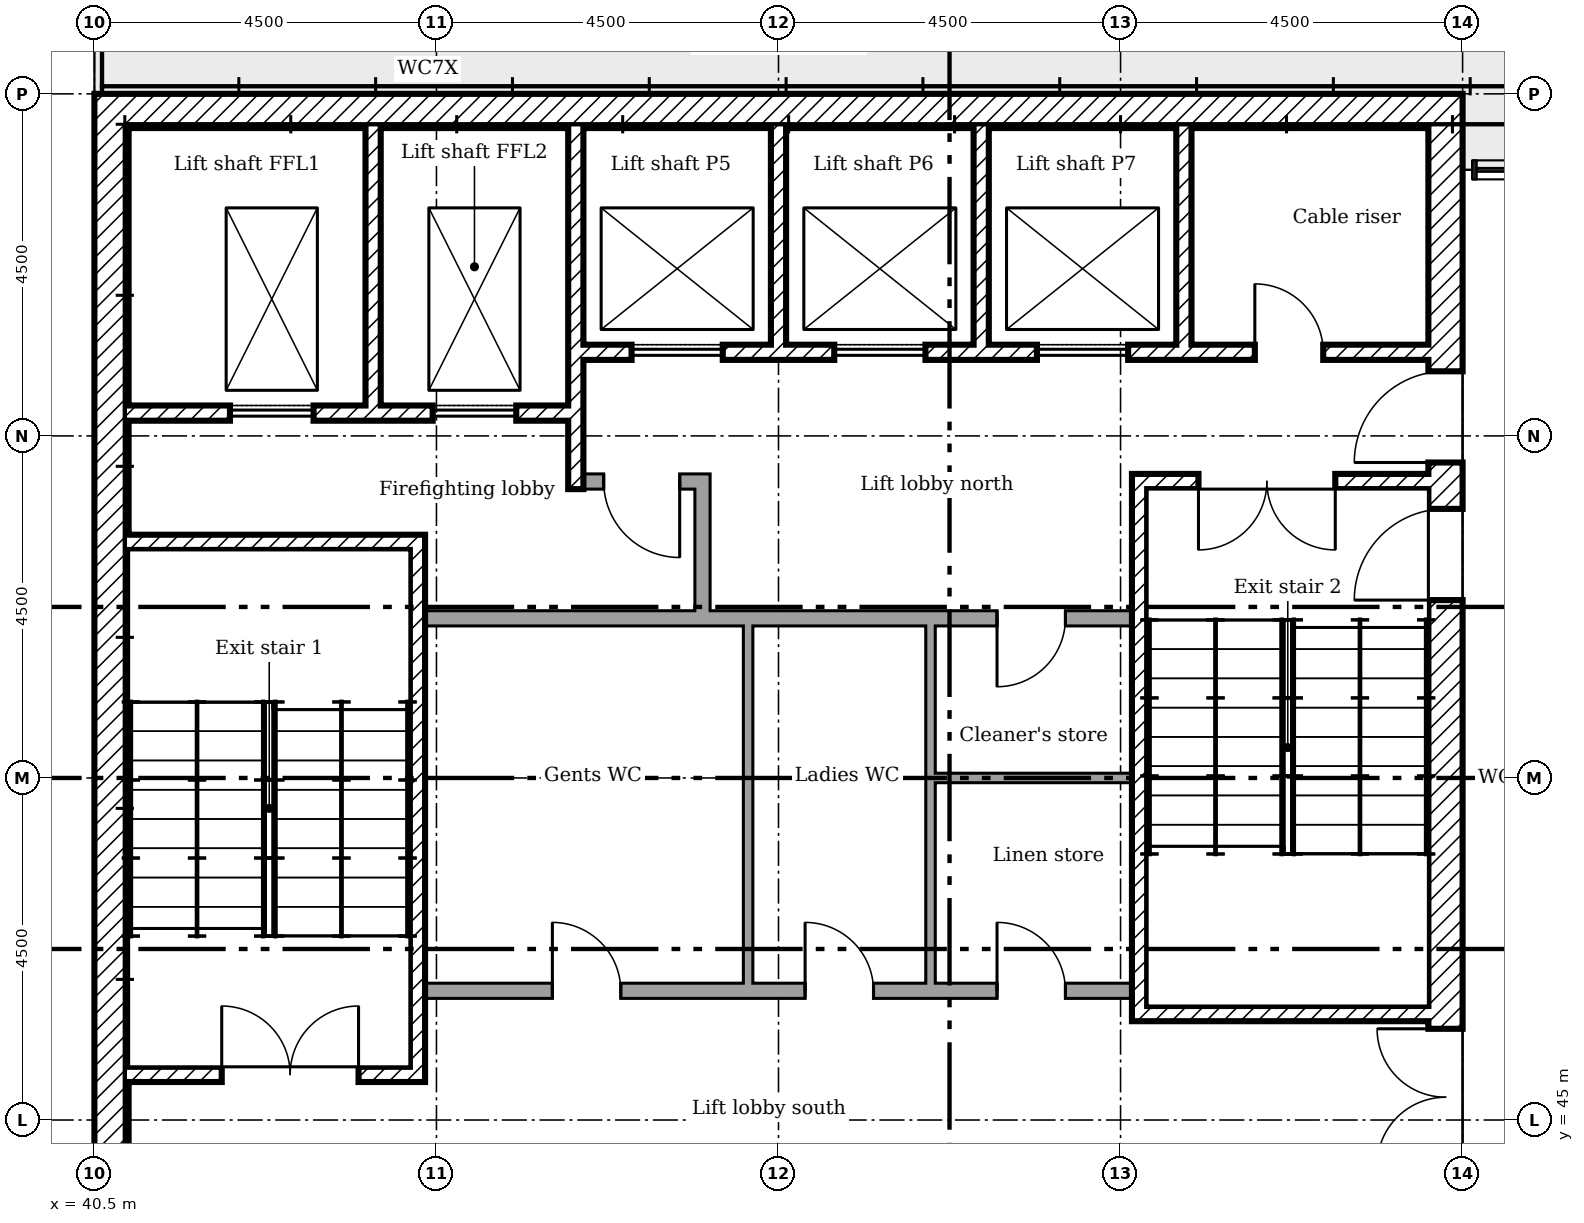
"""IFC4 building model, lengths in metres.
Left out: names, types, materials, properties, quantities, classifications, styles, units other than length and angle.
Written with IfcOpenShell. Run it as: python <this file> out.ifc"""

import sys

from ifc_helpers import new_model, si_unit, direction, frame, frame_2d, origin, place, context, subcontext, project, spatial, rectangle, extrude, element, fill, save


model = new_model("IFC4")
c1 = context("Model", 3, precision=1e-05, world=origin(), true_north=direction((0.0, 1.0)))
c2 = subcontext(c1, "Body", "Model", "MODEL_VIEW")
j1 = project(units=[si_unit("LENGTHUNIT", "METRE"), si_unit("PLANEANGLEUNIT", "RADIAN")], contexts=[c1])
p1 = place(None, origin())
s1 = spatial("IfcSite", under=j1, at=p1, CompositionType="ELEMENT")
p2 = place(p1, origin())
s2 = spatial("IfcBuilding", under=s1, at=p2, CompositionType="ELEMENT")
p3 = place(p2, frame((0.0, 0.0, 263.6)))
s3 = spatial("IfcBuildingStorey", under=s2, at=p3, CompositionType="ELEMENT", Elevation=263.6)
p4 = place(p3, frame((58.275, 40.5, 0.0), z_axis=(0.0, 0.0, 1.0), x_axis=(0.0, 1.0, 0.0)))
e1 = element("IfcWall", 1, at=p4, inside=s3, PredefinedType="SHEAR", context=c2, shape_type="SweptSolid", body=[
    extrude(rectangle(XDim=18.0, YDim=0.45, at=frame_2d((9.0, 0.0))), origin(), (0.0, 0.0, 1.0), 5.725),
])
p5 = place(p4, frame((13.15, 0.0, 0.0)))
e2 = element("IfcOpeningElement", 2, at=p5, cuts=e1, PredefinedType="OPENING", context=c2, shape_type="SweptSolid", body=[
    extrude(rectangle(XDim=1.2, YDim=2.1, at=frame_2d((0.6, 1.05))), frame((0.0, 0.235, 0.0), z_axis=(0.0, -1.0, 0.0), x_axis=(1.0, 0.0, 0.0)), (0.0, 0.0, 1.0), 0.47),
])
p6 = place(p4, frame((3.9, 0.0, 0.0)))
e3 = element("IfcOpeningElement", 3, at=p6, cuts=e1, PredefinedType="OPENING", context=c2, shape_type="SweptSolid", body=[
    extrude(rectangle(XDim=1.8, YDim=2.1, at=frame_2d((0.9, 1.05))), frame((0.0, 0.235, 0.0), z_axis=(0.0, -1.0, 0.0), x_axis=(1.0, 0.0, 0.0)), (0.0, 0.0, 1.0), 0.47),
])
p7 = place(p4, frame((11.34, 0.0, 0.0)))
e4 = element("IfcOpeningElement", 4, at=p7, cuts=e1, PredefinedType="OPENING", context=c2, shape_type="SweptSolid", body=[
    extrude(rectangle(XDim=1.2, YDim=2.1, at=frame_2d((0.6, 1.05))), frame((0.0, 0.235, 0.0), z_axis=(0.0, -1.0, 0.0), x_axis=(1.0, 0.0, 0.0)), (0.0, 0.0, 1.0), 0.47),
])
p8 = place(p3, frame((40.5, 58.275, 0.0)))
e5 = element("IfcWall", 5, at=p8, inside=s3, PredefinedType="SHEAR", context=c2, shape_type="SweptSolid", body=[
    extrude(rectangle(XDim=17.55, YDim=0.45, at=frame_2d((8.775, 0.0))), origin(), (0.0, 0.0, 1.0), 5.725),
])
p9 = place(p3, frame((40.725, 40.95, 0.0), z_axis=(0.0, 0.0, 1.0), x_axis=(0.0, 1.0, 0.0)))
e6 = element("IfcWall", 6, at=p9, inside=s3, PredefinedType="SHEAR", context=c2, shape_type="SweptSolid", body=[
    extrude(rectangle(XDim=17.1, YDim=0.45, at=frame_2d((8.55, 0.0))), origin(), (0.0, 0.0, 1.0), 5.725),
])
p10 = place(p3, frame((44.167, 58.05, 0.0), z_axis=(0.0, 0.0, 1.0), x_axis=(0.0, -1.0, 0.0)))
e7 = element("IfcWall", 7, at=p10, inside=s3, PredefinedType="SHEAR", context=c2, shape_type="SweptSolid", body=[
    extrude(rectangle(XDim=3.65, YDim=0.2, at=frame_2d((1.825, 0.0))), origin(), (0.0, 0.0, 1.0), 5.725),
])
p11 = place(p3, frame((46.833, 58.05, 0.0), z_axis=(0.0, 0.0, 1.0), x_axis=(0.0, -1.0, 0.0)))
e8 = element("IfcWall", 8, at=p11, inside=s3, PredefinedType="SHEAR", context=c2, shape_type="SweptSolid", body=[
    extrude(rectangle(XDim=4.75, YDim=0.2, at=frame_2d((2.375, 0.0))), origin(), (0.0, 0.0, 1.0), 5.725),
])
for number, where, z_axis, x_axis in (
    (9, (49.5, 58.05, 0.0), (0.0, 0.0, 1.0), (0.0, -1.0, 0.0)),
    (10, (52.167, 58.05, 0.0), (0.0, 0.0, 1.0), (0.0, -1.0, 0.0)),
    (11, (54.833, 58.05, 0.0), (0.0, 0.0, 1.0), (0.0, -1.0, 0.0)),
):
    element("IfcWall", number, at=place(p3, frame(where, z_axis=z_axis, x_axis=x_axis)), inside=s3, PredefinedType="SHEAR", context=c2, shape_type="SweptSolid", body=[
        extrude(rectangle(XDim=2.85, YDim=0.2, at=frame_2d((1.425, 0.0))), origin(), (0.0, 0.0, 1.0), 5.725),
    ])
p12 = place(p3, frame((48.5, 51.6, 0.0), z_axis=(0.0, 0.0, 1.0), x_axis=(0.0, 1.0, 0.0)))
e12 = element("IfcWall", 12, at=p12, inside=s3, PredefinedType="PARTITIONING", context=c2, shape_type="SweptSolid", body=[
    extrude(rectangle(XDim=1.9, YDim=0.2, at=frame_2d((0.95, 0.0))), origin(), (0.0, 0.0, 1.0), 5.725),
])
p13 = place(p3, frame((46.933, 53.4, 0.0)))
e13 = element("IfcWall", 13, at=p13, inside=s3, PredefinedType="PARTITIONING", context=c2, shape_type="SweptSolid", body=[
    extrude(rectangle(XDim=1.467, YDim=0.2, at=frame_2d((0.733, 0.0))), origin(), (0.0, 0.0, 1.0), 5.725),
])
p14 = place(p13, frame((0.267, 0.0, 0.0)))
e14 = element("IfcOpeningElement", 14, at=p14, cuts=e13, PredefinedType="OPENING", context=c2, shape_type="SweptSolid", body=[
    extrude(rectangle(XDim=1.0, YDim=2.1, at=frame_2d((0.5, 1.05))), frame((0.0, 0.11, 0.0), z_axis=(0.0, -1.0, 0.0), x_axis=(1.0, 0.0, 0.0)), (0.0, 0.0, 1.0), 0.22),
])
p15 = place(p3, frame((46.933, 55.1, 0.0)))
e15 = element("IfcWall", 15, at=p15, inside=s3, PredefinedType="SHEAR", context=c2, shape_type="SweptSolid", body=[
    extrude(rectangle(XDim=11.117, YDim=0.2, at=frame_2d((5.558, 0.0))), origin(), (0.0, 0.0, 1.0), 5.725),
])
p16 = place(p15, frame((8.833, 0.0, 0.0)))
e16 = element("IfcOpeningElement", 16, at=p16, cuts=e15, PredefinedType="OPENING", context=c2, shape_type="SweptSolid", body=[
    extrude(rectangle(XDim=0.9, YDim=2.1, at=frame_2d((0.45, 1.05))), frame((0.0, 0.11, 0.0), z_axis=(0.0, -1.0, 0.0), x_axis=(1.0, 0.0, 0.0)), (0.0, 0.0, 1.0), 0.22),
])
p17 = place(p15, frame((0.633, 0.0, 0.0)))
e17 = element("IfcOpeningElement", 17, at=p17, cuts=e15, PredefinedType="OPENING", context=c2, shape_type="SweptSolid", body=[
    extrude(rectangle(XDim=1.2, YDim=2.1, at=frame_2d((0.6, 1.05))), frame((0.0, 0.11, 0.0), z_axis=(0.0, -1.0, 0.0), x_axis=(1.0, 0.0, 0.0)), (0.0, 0.0, 1.0), 0.22),
])
p18 = place(p15, frame((3.3, 0.0, 0.0)))
e18 = element("IfcOpeningElement", 18, at=p18, cuts=e15, PredefinedType="OPENING", context=c2, shape_type="SweptSolid", body=[
    extrude(rectangle(XDim=1.2, YDim=2.1, at=frame_2d((0.6, 1.05))), frame((0.0, 0.11, 0.0), z_axis=(0.0, -1.0, 0.0), x_axis=(1.0, 0.0, 0.0)), (0.0, 0.0, 1.0), 0.22),
])
p19 = place(p15, frame((5.967, 0.0, 0.0)))
e19 = element("IfcOpeningElement", 19, at=p19, cuts=e15, PredefinedType="OPENING", context=c2, shape_type="SweptSolid", body=[
    extrude(rectangle(XDim=1.2, YDim=2.1, at=frame_2d((0.6, 1.05))), frame((0.0, 0.11, 0.0), z_axis=(0.0, -1.0, 0.0), x_axis=(1.0, 0.0, 0.0)), (0.0, 0.0, 1.0), 0.22),
])
p20 = place(p3, frame((40.95, 54.3, 0.0)))
e20 = element("IfcWall", 20, at=p20, inside=s3, PredefinedType="SHEAR", context=c2, shape_type="SweptSolid", body=[
    extrude(rectangle(XDim=5.783, YDim=0.2, at=frame_2d((2.892, 0.0))), origin(), (0.0, 0.0, 1.0), 5.725),
])
p21 = place(p20, frame((1.333, 0.0, 0.0)))
e21 = element("IfcOpeningElement", 21, at=p21, cuts=e20, PredefinedType="OPENING", context=c2, shape_type="SweptSolid", body=[
    extrude(rectangle(XDim=1.1, YDim=2.1, at=frame_2d((0.55, 1.05))), frame((0.0, 0.11, 0.0), z_axis=(0.0, -1.0, 0.0), x_axis=(1.0, 0.0, 0.0)), (0.0, 0.0, 1.0), 0.22),
])
p22 = place(p20, frame((4.0, 0.0, 0.0)))
e22 = element("IfcOpeningElement", 22, at=p22, cuts=e20, PredefinedType="OPENING", context=c2, shape_type="SweptSolid", body=[
    extrude(rectangle(XDim=1.1, YDim=2.1, at=frame_2d((0.55, 1.05))), frame((0.0, 0.11, 0.0), z_axis=(0.0, -1.0, 0.0), x_axis=(1.0, 0.0, 0.0)), (0.0, 0.0, 1.0), 0.22),
])
p23 = place(p3, frame((44.75, 45.5, 0.0), z_axis=(0.0, 0.0, 1.0), x_axis=(0.0, 1.0, 0.0)))
e23 = element("IfcWall", 23, at=p23, inside=s3, PredefinedType="SHEAR", context=c2, shape_type="SweptSolid", body=[
    extrude(rectangle(XDim=7.2, YDim=0.2, at=frame_2d((3.6, 0.0))), origin(), (0.0, 0.0, 1.0), 5.725),
])
p24 = place(p3, frame((40.95, 52.6, 0.0)))
e24 = element("IfcWall", 24, at=p24, inside=s3, PredefinedType="SHEAR", context=c2, shape_type="SweptSolid", body=[
    extrude(rectangle(XDim=3.7, YDim=0.2, at=frame_2d((1.85, 0.0))), origin(), (0.0, 0.0, 1.0), 5.725),
])
p25 = place(p3, frame((40.95, 45.6, 0.0)))
e25 = element("IfcWall", 25, at=p25, inside=s3, PredefinedType="SHEAR", context=c2, shape_type="SweptSolid", body=[
    extrude(rectangle(XDim=3.7, YDim=0.2, at=frame_2d((1.85, 0.0))), origin(), (0.0, 0.0, 1.0), 5.725),
])
p26 = place(p25, frame((1.225, 0.0, 0.0)))
e26 = element("IfcOpeningElement", 26, at=p26, cuts=e25, PredefinedType="OPENING", context=c2, shape_type="SweptSolid", body=[
    extrude(rectangle(XDim=1.8, YDim=2.1, at=frame_2d((0.9, 1.05))), frame((0.0, 0.11, 0.0), z_axis=(0.0, -1.0, 0.0), x_axis=(1.0, 0.0, 0.0)), (0.0, 0.0, 1.0), 0.22),
])
p27 = place(p3, frame((54.15, 53.4, 0.0)))
e27 = element("IfcWall", 27, at=p27, inside=s3, PredefinedType="SHEAR", context=c2, shape_type="SweptSolid", body=[
    extrude(rectangle(XDim=3.9, YDim=0.2, at=frame_2d((1.95, 0.0))), origin(), (0.0, 0.0, 1.0), 5.725),
])
p28 = place(p27, frame((0.875, 0.0, 0.0)))
e28 = element("IfcOpeningElement", 28, at=p28, cuts=e27, PredefinedType="OPENING", context=c2, shape_type="SweptSolid", body=[
    extrude(rectangle(XDim=1.8, YDim=2.1, at=frame_2d((0.9, 1.05))), frame((0.0, 0.11, 0.0), z_axis=(0.0, -1.0, 0.0), x_axis=(1.0, 0.0, 0.0)), (0.0, 0.0, 1.0), 0.22),
])
p29 = place(p3, frame((54.15, 46.4, 0.0)))
e29 = element("IfcWall", 29, at=p29, inside=s3, PredefinedType="SHEAR", context=c2, shape_type="SweptSolid", body=[
    extrude(rectangle(XDim=3.9, YDim=0.2, at=frame_2d((1.95, 0.0))), origin(), (0.0, 0.0, 1.0), 5.725),
])
p30 = place(p3, frame((54.25, 46.5, 0.0), z_axis=(0.0, 0.0, 1.0), x_axis=(0.0, 1.0, 0.0)))
e30 = element("IfcWall", 30, at=p30, inside=s3, PredefinedType="SHEAR", context=c2, shape_type="SweptSolid", body=[
    extrude(rectangle(XDim=6.8, YDim=0.2, at=frame_2d((3.4, 0.0))), origin(), (0.0, 0.0, 1.0), 5.725),
])
p31 = place(p3, frame((44.85, 51.6, 0.0)))
e31 = element("IfcWall", 31, at=p31, inside=s3, PredefinedType="PARTITIONING", context=c2, shape_type="SweptSolid", body=[
    extrude(rectangle(XDim=9.3, YDim=0.2, at=frame_2d((4.65, 0.0))), origin(), (0.0, 0.0, 1.0), 5.725),
])
p32 = place(p31, frame((7.525, 0.0, 0.0)))
e32 = element("IfcOpeningElement", 32, at=p32, cuts=e31, PredefinedType="OPENING", context=c2, shape_type="SweptSolid", body=[
    extrude(rectangle(XDim=0.9, YDim=2.1, at=frame_2d((0.45, 1.05))), frame((0.0, 0.11, 0.0), z_axis=(0.0, -1.0, 0.0), x_axis=(1.0, 0.0, 0.0)), (0.0, 0.0, 1.0), 0.22),
])
p33 = place(p3, frame((44.85, 46.7, 0.0)))
e33 = element("IfcWall", 33, at=p33, inside=s3, PredefinedType="PARTITIONING", context=c2, shape_type="SweptSolid", body=[
    extrude(rectangle(XDim=9.3, YDim=0.2, at=frame_2d((4.65, 0.0))), origin(), (0.0, 0.0, 1.0), 5.725),
])
p34 = place(p33, frame((1.675, 0.0, 0.0)))
e34 = element("IfcOpeningElement", 34, at=p34, cuts=e33, PredefinedType="OPENING", context=c2, shape_type="SweptSolid", body=[
    extrude(rectangle(XDim=0.9, YDim=2.1, at=frame_2d((0.45, 1.05))), frame((0.0, 0.11, 0.0), z_axis=(0.0, -1.0, 0.0), x_axis=(1.0, 0.0, 0.0)), (0.0, 0.0, 1.0), 0.22),
])
p35 = place(p33, frame((5.0, 0.0, 0.0)))
e35 = element("IfcOpeningElement", 35, at=p35, cuts=e33, PredefinedType="OPENING", context=c2, shape_type="SweptSolid", body=[
    extrude(rectangle(XDim=0.9, YDim=2.1, at=frame_2d((0.45, 1.05))), frame((0.0, 0.11, 0.0), z_axis=(0.0, -1.0, 0.0), x_axis=(1.0, 0.0, 0.0)), (0.0, 0.0, 1.0), 0.22),
])
p36 = place(p33, frame((7.525, 0.0, 0.0)))
e36 = element("IfcOpeningElement", 36, at=p36, cuts=e33, PredefinedType="OPENING", context=c2, shape_type="SweptSolid", body=[
    extrude(rectangle(XDim=0.9, YDim=2.1, at=frame_2d((0.45, 1.05))), frame((0.0, 0.11, 0.0), z_axis=(0.0, -1.0, 0.0), x_axis=(1.0, 0.0, 0.0)), (0.0, 0.0, 1.0), 0.22),
])
p37 = place(p3, frame((49.1, 46.8, 0.0), z_axis=(0.0, 0.0, 1.0), x_axis=(0.0, 1.0, 0.0)))
e37 = element("IfcWall", 37, at=p37, inside=s3, PredefinedType="PARTITIONING", context=c2, shape_type="SweptSolid", body=[
    extrude(rectangle(XDim=4.7, YDim=0.125, at=frame_2d((2.35, 0.0))), origin(), (0.0, 0.0, 1.0), 5.725),
])
p38 = place(p3, frame((51.5, 46.8, 0.0), z_axis=(0.0, 0.0, 1.0), x_axis=(0.0, 1.0, 0.0)))
e38 = element("IfcWall", 38, at=p38, inside=s3, PredefinedType="PARTITIONING", context=c2, shape_type="SweptSolid", body=[
    extrude(rectangle(XDim=2.762, YDim=0.125, at=frame_2d((1.381, 0.0))), origin(), (0.0, 0.0, 1.0), 5.725),
])
p39 = place(p3, frame((51.562, 49.5, 0.0)))
e39 = element("IfcWall", 39, at=p39, inside=s3, PredefinedType="PARTITIONING", context=c2, shape_type="SweptSolid", body=[
    extrude(rectangle(XDim=2.587, YDim=0.125, at=frame_2d((1.294, 0.0))), origin(), (0.0, 0.0, 1.0), 5.725),
])
p40 = place(p3, frame((51.5, 49.5, 0.0), z_axis=(0.0, 0.0, 1.0), x_axis=(0.0, 1.0, 0.0)))
e40 = element("IfcWall", 40, at=p40, inside=s3, PredefinedType="PARTITIONING", context=c2, shape_type="SweptSolid", body=[
    extrude(rectangle(XDim=2.0, YDim=0.125, at=frame_2d((1.0, 0.0))), origin(), (0.0, 0.0, 1.0), 5.725),
])
p41 = place(p5, origin())
e41 = element("IfcDoor", 41, at=p41, inside=s3, OperationType="SINGLE_SWING_RIGHT", PredefinedType="DOOR", context=c2, shape_type="SweptSolid", body=[
    extrude(rectangle(XDim=1.2, YDim=2.1, at=frame_2d((0.6, 1.05))), frame((0.0, 0.025, 0.0), z_axis=(0.0, -1.0, 0.0), x_axis=(1.0, 0.0, 0.0)), (0.0, 0.0, 1.0), 0.05),
])
fill(e2, e41)
p42 = place(p6, origin())
e42 = element("IfcDoor", 42, at=p42, inside=s3, OperationType="DOUBLE_DOOR_SINGLE_SWING", PredefinedType="DOOR", context=c2, shape_type="SweptSolid", body=[
    extrude(rectangle(XDim=1.8, YDim=2.1, at=frame_2d((0.9, 1.05))), frame((0.0, 0.025, 0.0), z_axis=(0.0, -1.0, 0.0), x_axis=(1.0, 0.0, 0.0)), (0.0, 0.0, 1.0), 0.05),
])
fill(e3, e42)
p43 = place(p26, origin())
e43 = element("IfcDoor", 43, at=p43, inside=s3, OperationType="DOUBLE_DOOR_SINGLE_SWING", PredefinedType="DOOR", context=c2, shape_type="SweptSolid", body=[
    extrude(rectangle(XDim=1.8, YDim=2.1, at=frame_2d((0.9, 1.05))), frame((0.0, 0.025, 0.0), z_axis=(0.0, -1.0, 0.0), x_axis=(1.0, 0.0, 0.0)), (0.0, 0.0, 1.0), 0.05),
])
fill(e26, e43)
p44 = place(p28, frame((1.8, 0.0, 0.0), x_axis=(-1.0, 0.0, 0.0)))
e44 = element("IfcDoor", 44, at=p44, inside=s3, OperationType="DOUBLE_DOOR_SINGLE_SWING", PredefinedType="DOOR", context=c2, shape_type="SweptSolid", body=[
    extrude(rectangle(XDim=1.8, YDim=2.1, at=frame_2d((0.9, 1.05))), frame((0.0, 0.025, 0.0), z_axis=(0.0, -1.0, 0.0), x_axis=(1.0, 0.0, 0.0)), (0.0, 0.0, 1.0), 0.05),
])
fill(e28, e44)
p45 = place(p7, origin())
e45 = element("IfcDoor", 45, at=p45, inside=s3, OperationType="SINGLE_SWING_RIGHT", PredefinedType="DOOR", context=c2, shape_type="SweptSolid", body=[
    extrude(rectangle(XDim=1.2, YDim=2.1, at=frame_2d((0.6, 1.05))), frame((0.0, 0.025, 0.0), z_axis=(0.0, -1.0, 0.0), x_axis=(1.0, 0.0, 0.0)), (0.0, 0.0, 1.0), 0.05),
])
fill(e4, e45)
p46 = place(p14, frame((1.0, 0.0, 0.0), x_axis=(-1.0, 0.0, 0.0)))
e46 = element("IfcDoor", 46, at=p46, inside=s3, OperationType="SINGLE_SWING_RIGHT", PredefinedType="DOOR", context=c2, shape_type="SweptSolid", body=[
    extrude(rectangle(XDim=1.0, YDim=2.1, at=frame_2d((0.5, 1.05))), frame((0.0, 0.025, 0.0), z_axis=(0.0, -1.0, 0.0), x_axis=(1.0, 0.0, 0.0)), (0.0, 0.0, 1.0), 0.05),
])
fill(e14, e46)
p47 = place(p16, origin())
e47 = element("IfcDoor", 47, at=p47, inside=s3, OperationType="SINGLE_SWING_RIGHT", PredefinedType="DOOR", context=c2, shape_type="SweptSolid", body=[
    extrude(rectangle(XDim=0.9, YDim=2.1, at=frame_2d((0.45, 1.05))), frame((0.0, 0.025, 0.0), z_axis=(0.0, -1.0, 0.0), x_axis=(1.0, 0.0, 0.0)), (0.0, 0.0, 1.0), 0.05),
])
fill(e16, e47)
p48 = place(p34, origin())
e48 = element("IfcDoor", 48, at=p48, inside=s3, OperationType="SINGLE_SWING_RIGHT", PredefinedType="DOOR", context=c2, shape_type="SweptSolid", body=[
    extrude(rectangle(XDim=0.9, YDim=2.1, at=frame_2d((0.45, 1.05))), frame((0.0, 0.025, 0.0), z_axis=(0.0, -1.0, 0.0), x_axis=(1.0, 0.0, 0.0)), (0.0, 0.0, 1.0), 0.05),
])
fill(e34, e48)
p49 = place(p35, origin())
e49 = element("IfcDoor", 49, at=p49, inside=s3, OperationType="SINGLE_SWING_RIGHT", PredefinedType="DOOR", context=c2, shape_type="SweptSolid", body=[
    extrude(rectangle(XDim=0.9, YDim=2.1, at=frame_2d((0.45, 1.05))), frame((0.0, 0.025, 0.0), z_axis=(0.0, -1.0, 0.0), x_axis=(1.0, 0.0, 0.0)), (0.0, 0.0, 1.0), 0.05),
])
fill(e35, e49)
p50 = place(p32, frame((0.9, 0.0, 0.0), x_axis=(-1.0, 0.0, 0.0)))
e50 = element("IfcDoor", 50, at=p50, inside=s3, OperationType="SINGLE_SWING_LEFT", PredefinedType="DOOR", context=c2, shape_type="SweptSolid", body=[
    extrude(rectangle(XDim=0.9, YDim=2.1, at=frame_2d((0.45, 1.05))), frame((0.0, 0.025, 0.0), z_axis=(0.0, -1.0, 0.0), x_axis=(1.0, 0.0, 0.0)), (0.0, 0.0, 1.0), 0.05),
])
fill(e32, e50)
p51 = place(p36, origin())
e51 = element("IfcDoor", 51, at=p51, inside=s3, OperationType="SINGLE_SWING_RIGHT", PredefinedType="DOOR", context=c2, shape_type="SweptSolid", body=[
    extrude(rectangle(XDim=0.9, YDim=2.1, at=frame_2d((0.45, 1.05))), frame((0.0, 0.025, 0.0), z_axis=(0.0, -1.0, 0.0), x_axis=(1.0, 0.0, 0.0)), (0.0, 0.0, 1.0), 0.05),
])
fill(e36, e51)
p52 = place(p21, origin())
e52 = element("IfcDoor", 52, at=p52, inside=s3, OperationType="SLIDING_TO_LEFT", PredefinedType="DOOR", context=c2, shape_type="SweptSolid", body=[
    extrude(rectangle(XDim=1.1, YDim=2.1, at=frame_2d((0.55, 1.05))), frame((0.0, 0.025, 0.0), z_axis=(0.0, -1.0, 0.0), x_axis=(1.0, 0.0, 0.0)), (0.0, 0.0, 1.0), 0.05),
])
fill(e21, e52)
p53 = place(p22, origin())
e53 = element("IfcDoor", 53, at=p53, inside=s3, OperationType="SLIDING_TO_LEFT", PredefinedType="DOOR", context=c2, shape_type="SweptSolid", body=[
    extrude(rectangle(XDim=1.1, YDim=2.1, at=frame_2d((0.55, 1.05))), frame((0.0, 0.025, 0.0), z_axis=(0.0, -1.0, 0.0), x_axis=(1.0, 0.0, 0.0)), (0.0, 0.0, 1.0), 0.05),
])
fill(e22, e53)
p54 = place(p17, origin())
e54 = element("IfcDoor", 54, at=p54, inside=s3, OperationType="SLIDING_TO_LEFT", PredefinedType="DOOR", context=c2, shape_type="SweptSolid", body=[
    extrude(rectangle(XDim=1.2, YDim=2.1, at=frame_2d((0.6, 1.05))), frame((0.0, 0.025, 0.0), z_axis=(0.0, -1.0, 0.0), x_axis=(1.0, 0.0, 0.0)), (0.0, 0.0, 1.0), 0.05),
])
fill(e17, e54)
p55 = place(p18, origin())
e55 = element("IfcDoor", 55, at=p55, inside=s3, OperationType="SLIDING_TO_LEFT", PredefinedType="DOOR", context=c2, shape_type="SweptSolid", body=[
    extrude(rectangle(XDim=1.2, YDim=2.1, at=frame_2d((0.6, 1.05))), frame((0.0, 0.025, 0.0), z_axis=(0.0, -1.0, 0.0), x_axis=(1.0, 0.0, 0.0)), (0.0, 0.0, 1.0), 0.05),
])
fill(e18, e55)
p56 = place(p19, origin())
e56 = element("IfcDoor", 56, at=p56, inside=s3, OperationType="SLIDING_TO_LEFT", PredefinedType="DOOR", context=c2, shape_type="SweptSolid", body=[
    extrude(rectangle(XDim=1.2, YDim=2.1, at=frame_2d((0.6, 1.05))), frame((0.0, 0.025, 0.0), z_axis=(0.0, -1.0, 0.0), x_axis=(1.0, 0.0, 0.0)), (0.0, 0.0, 1.0), 0.05),
])
fill(e19, e56)
save(model, sys.argv[1])
